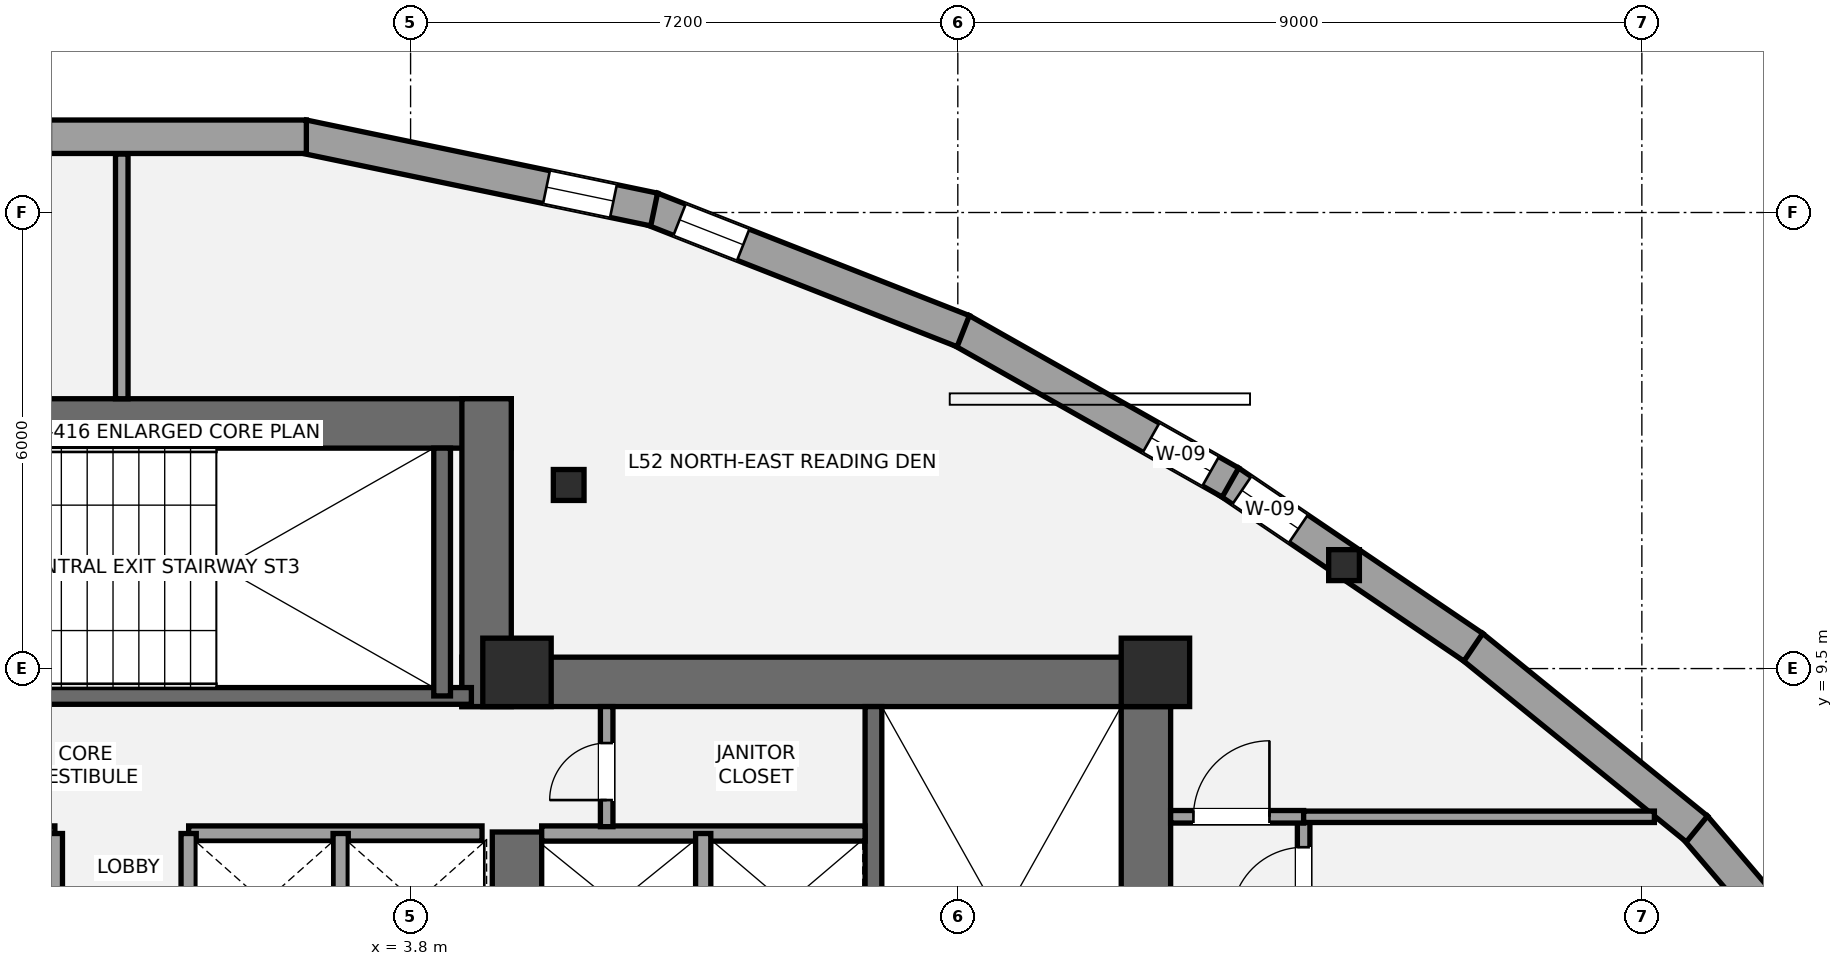
"""IFC4 building model, lengths in metres.
Left out: names, types, materials, properties, quantities, classifications, styles, units other than length and angle.
Written with IfcOpenShell. Run it as: python <this file> out.ifc"""

import sys

from ifc_helpers import new_model, si_unit, direction, frame, frame_2d, origin, origin_2d, place, context, subcontext, project, spatial, rectangle, i_section, extrude, element, fill, save


model = new_model("IFC4")
c1 = context("Model", 3, precision=1e-05, world=origin(), true_north=direction((0.0, 1.0)))
c2 = subcontext(c1, "Body", "Model", "MODEL_VIEW")
j1 = project(units=[si_unit("LENGTHUNIT", "METRE"), si_unit("PLANEANGLEUNIT", "RADIAN")], contexts=[c1])
p1 = place(None, origin())
s1 = spatial("IfcSite", under=j1, at=p1, CompositionType="ELEMENT")
p2 = place(p1, origin())
s2 = spatial("IfcBuilding", under=s1, at=p2, CompositionType="ELEMENT")
p3 = place(p2, frame((0.0, 0.0, 188.6)))
s3 = spatial("IfcBuildingStorey", under=s2, at=p3, CompositionType="ELEMENT", Elevation=188.6)
p4 = place(p3, frame((13.475, 1.2, 0.0), z_axis=(0.0, 0.0, 1.0), x_axis=(0.0, 1.0, 0.0)))
e1 = element("IfcWall", 1, at=p4, inside=s3, PredefinedType="SHEAR", context=c2, shape_type="SweptSolid", body=[
    extrude(rectangle(XDim=8.45, YDim=0.65, at=frame_2d((4.225, 0.0))), origin(), (0.0, 0.0, 1.0), 3.2),
])
p5 = place(p3, frame((4.475, 9.325, 0.0), z_axis=(0.0, 0.0, 1.0), x_axis=(1.0, 0.0, 0.0)))
e2 = element("IfcWall", 2, at=p5, inside=s3, PredefinedType="SHEAR", context=c2, shape_type="SweptSolid", body=[
    extrude(rectangle(XDim=9.325, YDim=0.65, at=frame_2d((4.663, 0.0))), origin(), (0.0, 0.0, 1.0), 3.2),
])
p6 = place(p3, frame((5.2, 5.35, 0.0), z_axis=(0.0, 0.0, 1.0), x_axis=(0.0, 1.0, 0.0)))
e3 = element("IfcWall", 3, at=p6, inside=s3, PredefinedType="SHEAR", context=c2, shape_type="SweptSolid", body=[
    extrude(rectangle(XDim=2.0, YDim=0.65, at=frame_2d((1.0, 0.0))), origin(), (0.0, 0.0, 1.0), 3.2),
])
p7 = place(p3, frame((9.89, 1.85, 0.0), z_axis=(0.0, 0.0, 1.0), x_axis=(0.0, 1.0, 0.0)))
e4 = element("IfcWall", 4, at=p7, inside=s3, PredefinedType="SHEAR", context=c2, shape_type="SweptSolid", body=[
    extrude(rectangle(XDim=7.15, YDim=0.22, at=frame_2d((3.575, 0.0))), origin(), (0.0, 0.0, 1.0), 3.2),
])
p8 = place(p3, frame((-5.125, 12.725, 0.0), z_axis=(0.0, 0.0, 1.0), x_axis=(1.0, 0.0, 0.0)))
e5 = element("IfcWall", 5, at=p8, inside=s3, PredefinedType="SHEAR", context=c2, shape_type="SweptSolid", body=[
    extrude(rectangle(XDim=10.25, YDim=0.65, at=frame_2d((5.125, 0.0))), origin(), (0.0, 0.0, 1.0), 3.2),
])
p9 = place(p3, frame((4.8, 9.0, 0.0), z_axis=(0.0, 0.0, 1.0), x_axis=(0.0, 1.0, 0.0)))
e6 = element("IfcWall", 6, at=p9, inside=s3, PredefinedType="SHEAR", context=c2, shape_type="SweptSolid", body=[
    extrude(rectangle(XDim=4.05, YDim=0.65, at=frame_2d((2.025, 0.0))), origin(), (0.0, 0.0, 1.0), 3.2),
])
p10 = place(p3, frame((-4.7, 9.14, 0.0), z_axis=(0.0, 0.0, 1.0), x_axis=(1.0, 0.0, 0.0)))
e7 = element("IfcWall", 7, at=p10, inside=s3, PredefinedType="SHEAR", context=c2, shape_type="SweptSolid", body=[
    extrude(rectangle(XDim=9.3, YDim=0.22, at=frame_2d((4.65, 0.0))), origin(), (0.0, 0.0, 1.0), 3.2),
])
p11 = place(p10, frame((1.15, 0.0, 0.0)))
e8 = element("IfcOpeningElement", 8, at=p11, cuts=e7, PredefinedType="OPENING", context=c2, shape_type="SweptSolid", body=[
    extrude(rectangle(XDim=1.05, YDim=2.15, at=frame_2d((0.525, 1.075))), frame((0.0, 0.12, 0.0), z_axis=(0.0, -1.0, 0.0), x_axis=(1.0, 0.0, 0.0)), (0.0, 0.0, 1.0), 0.24),
])
p12 = place(p3, frame((4.215, 9.14, 0.0), z_axis=(0.0, 0.0, 1.0), x_axis=(0.0, 1.0, 0.0)))
e9 = element("IfcWall", 9, at=p12, inside=s3, PredefinedType="SHEAR", context=c2, shape_type="SweptSolid", body=[
    extrude(rectangle(XDim=3.26, YDim=0.22, at=frame_2d((1.63, 0.0))), origin(), (0.0, 0.0, 1.0), 3.2),
])
for number, where, z_axis, x_axis in (
    (10, (5.2, 9.45, 0.0), (0.0, 0.0, 1.0), (1.0, 0.0, 0.0)),
    (11, (13.6, 9.45, 0.0), (0.0, 0.0, 1.0), (1.0, 0.0, 0.0)),
):
    element("IfcColumn", number, at=place(p3, frame(where, z_axis=z_axis, x_axis=x_axis)), inside=s3, PredefinedType="COLUMN", context=c2, shape_type="SweptSolid", body=[
        extrude(rectangle(XDim=0.9, YDim=0.9, at=origin_2d()), origin(), (0.0, 0.0, 1.0), 3.2),
    ])
for number, where, z_axis, x_axis in (
    (12, (16.082, 10.861, 0.0), (0.0, 0.0, 1.0), (1.0, 0.0, 0.0)),
    (13, (5.88, 11.915, 0.0), (0.0, 0.0, 1.0), (1.0, 0.0, 0.0)),
):
    element("IfcColumn", number, at=place(p3, frame(where, z_axis=z_axis, x_axis=x_axis)), inside=s3, PredefinedType="COLUMN", context=c2, shape_type="SweptSolid", body=[
        extrude(i_section(OverallWidth=0.404, OverallDepth=0.407, WebThickness=0.027, FlangeThickness=0.044, at=origin_2d()), origin(), (0.0, 0.0, 1.0), 3.2),
    ])
p13 = place(p3, frame((20.696, 7.417, 0.0), z_axis=(0.0, 0.0, 1.0), x_axis=(0.649641806751, -0.760240437573, 0.0)))
e14 = element("IfcWall", 14, at=p13, inside=s3, PredefinedType="STANDARD", context=c2, shape_type="SweptSolid", body=[
    extrude(rectangle(XDim=3.658, YDim=0.44, at=frame_2d((1.829, 0.0))), origin(), (0.0, 0.0, 1.0), 2.315),
])
p14 = place(p3, frame((17.767, 9.792, 0.0), z_axis=(0.0, 0.0, 1.0), x_axis=(0.776145361002, -0.63055402512, 0.0)))
e15 = element("IfcWall", 15, at=p14, inside=s3, PredefinedType="STANDARD", context=c2, shape_type="SweptSolid", body=[
    extrude(rectangle(XDim=3.81, YDim=0.44, at=frame_2d((1.905, 0.0))), origin(), (0.0, 0.0, 1.0), 2.315),
])
p15 = place(p3, frame((14.571, 11.957, 0.0), z_axis=(0.0, 0.0, 1.0), x_axis=(0.82772633423, -0.56113199483, 0.0)))
e16 = element("IfcWall", 16, at=p15, inside=s3, PredefinedType="STANDARD", context=c2, shape_type="SweptSolid", body=[
    extrude(rectangle(XDim=3.879, YDim=0.44, at=frame_2d((1.939, 0.0))), origin(), (0.0, 0.0, 1.0), 2.315),
])
p16 = place(p15, frame((0.2, 0.0, 0.58)))
e17 = element("IfcOpeningElement", 17, at=p16, cuts=e16, PredefinedType="OPENING", context=c2, shape_type="SweptSolid", body=[
    extrude(rectangle(XDim=0.9, YDim=1.35, at=frame_2d((0.45, 0.675))), frame((0.0, 0.23, 0.0), z_axis=(0.0, -1.0, 0.0), x_axis=(1.0, 0.0, 0.0)), (0.0, 0.0, 1.0), 0.46),
])
p17 = place(p3, frame((11.043, 13.952, 0.0), z_axis=(0.0, 0.0, 1.0), x_axis=(0.870346086449, -0.492440544434, 0.0)))
e18 = element("IfcWall", 18, at=p17, inside=s3, PredefinedType="STANDARD", context=c2, shape_type="SweptSolid", body=[
    extrude(rectangle(XDim=4.071, YDim=0.44, at=frame_2d((2.036, 0.0))), origin(), (0.0, 0.0, 1.0), 2.315),
])
p18 = place(p17, frame((2.872, 0.0, 0.58)))
e19 = element("IfcOpeningElement", 19, at=p18, cuts=e18, PredefinedType="OPENING", context=c2, shape_type="SweptSolid", body=[
    extrude(rectangle(XDim=0.9, YDim=1.35, at=frame_2d((0.45, 0.675))), frame((0.0, 0.23, 0.0), z_axis=(0.0, -1.0, 0.0), x_axis=(1.0, 0.0, 0.0)), (0.0, 0.0, 1.0), 0.46),
])
p19 = place(p3, frame((6.969, 15.55, 0.0), z_axis=(0.0, 0.0, 1.0), x_axis=(0.930777752543, -0.365585524018, 0.0)))
e20 = element("IfcWall", 20, at=p19, inside=s3, PredefinedType="STANDARD", context=c2, shape_type="SweptSolid", body=[
    extrude(rectangle(XDim=4.407, YDim=0.44, at=frame_2d((2.203, 0.0))), origin(), (0.0, 0.0, 1.0), 2.315),
])
p20 = place(p19, frame((0.397, 0.0, 0.58)))
e21 = element("IfcOpeningElement", 21, at=p20, cuts=e20, PredefinedType="OPENING", context=c2, shape_type="SweptSolid", body=[
    extrude(rectangle(XDim=0.9, YDim=1.35, at=frame_2d((0.45, 0.675))), frame((0.0, 0.23, 0.0), z_axis=(0.0, -1.0, 0.0), x_axis=(1.0, 0.0, 0.0)), (0.0, 0.0, 1.0), 0.46),
])
p21 = place(p3, frame((2.384, 16.501, 0.0), z_axis=(0.0, 0.0, 1.0), x_axis=(0.979004509935, -0.203838586943, 0.0)))
e22 = element("IfcWall", 22, at=p21, inside=s3, PredefinedType="STANDARD", context=c2, shape_type="SweptSolid", body=[
    extrude(rectangle(XDim=4.72, YDim=0.44, at=frame_2d((2.36, 0.0))), origin(), (0.0, 0.0, 1.0), 2.315),
])
p22 = place(p21, frame((3.273, 0.0, 0.58)))
e23 = element("IfcOpeningElement", 23, at=p22, cuts=e22, PredefinedType="OPENING", context=c2, shape_type="SweptSolid", body=[
    extrude(rectangle(XDim=0.9, YDim=1.35, at=frame_2d((0.45, 0.675))), frame((0.0, 0.23, 0.0), z_axis=(0.0, -1.0, 0.0), x_axis=(1.0, 0.0, 0.0)), (0.0, 0.0, 1.0), 0.46),
])
p23 = place(p3, frame((-2.429, 16.497, 0.0), z_axis=(0.0, 0.0, 1.0), x_axis=(1.0, 0.0, 0.0)))
e24 = element("IfcWall", 24, at=p23, inside=s3, PredefinedType="STANDARD", context=c2, shape_type="SweptSolid", body=[
    extrude(rectangle(XDim=4.857, YDim=0.44, at=frame_2d((2.429, 0.0))), origin(), (0.0, 0.0, 1.0), 2.315),
])
p24 = place(p23, frame((0.595, 0.0, 0.58)))
e25 = element("IfcOpeningElement", 25, at=p24, cuts=e24, PredefinedType="OPENING", context=c2, shape_type="SweptSolid", body=[
    extrude(rectangle(XDim=0.9, YDim=1.35, at=frame_2d((0.45, 0.675))), frame((0.0, 0.23, 0.0), z_axis=(0.0, -1.0, 0.0), x_axis=(1.0, 0.0, 0.0)), (0.0, 0.0, 1.0), 0.46),
])
p25 = place(p3, frame((5.525, 7.33, 0.0), z_axis=(0.0, 0.0, 1.0), x_axis=(1.0, 0.0, 0.0)))
e26 = element("IfcWall", 26, at=p25, inside=s3, PredefinedType="SOLIDWALL", context=c2, shape_type="SweptSolid", body=[
    extrude(rectangle(XDim=4.255, YDim=0.2, at=frame_2d((2.127, 0.0))), origin(), (0.0, 0.0, 1.0), 3.02),
])
p26 = place(p3, frame((7.65, 5.47, 0.0), z_axis=(0.0, 0.0, 1.0), x_axis=(0.0, 1.0, 0.0)))
e27 = element("IfcWall", 27, at=p26, inside=s3, PredefinedType="SOLIDWALL", context=c2, shape_type="SweptSolid", body=[
    extrude(rectangle(XDim=1.86, YDim=0.2, at=frame_2d((0.93, 0.0))), origin(), (0.0, 0.0, 1.0), 3.02),
])
for number, where, z_axis, x_axis in (
    (28, (-4.74, 7.33, 0.0), (0.0, 0.0, 1.0), (1.0, 0.0, 0.0)),
    (29, (0.88, 7.33, 0.0), (0.0, 0.0, 1.0), (1.0, 0.0, 0.0)),
):
    element("IfcWall", number, at=place(p3, frame(where, z_axis=z_axis, x_axis=x_axis)), inside=s3, PredefinedType="SOLIDWALL", context=c2, shape_type="SweptSolid", body=[
        extrude(rectangle(XDim=3.86, YDim=0.2, at=frame_2d((1.93, 0.0))), origin(), (0.0, 0.0, 1.0), 3.02),
    ])
for number, where, z_axis, x_axis in (
    (30, (2.88, 5.52, 0.0), (0.0, 0.0, 1.0), (0.0, 1.0, 0.0)),
    (31, (-0.88, 5.52, 0.0), (0.0, 0.0, 1.0), (0.0, 1.0, 0.0)),
    (32, (0.88, 5.52, 0.0), (0.0, 0.0, 1.0), (0.0, 1.0, 0.0)),
):
    element("IfcWall", number, at=place(p3, frame(where, z_axis=z_axis, x_axis=x_axis)), inside=s3, PredefinedType="SOLIDWALL", context=c2, shape_type="SweptSolid", body=[
        extrude(rectangle(XDim=1.81, YDim=0.2, at=frame_2d((0.905, 0.0))), origin(), (0.0, 0.0, 1.0), 3.02),
    ])
p27 = place(p3, frame((6.38, 7.42, 0.0), z_axis=(0.0, 0.0, 1.0), x_axis=(0.0, 1.0, 0.0)))
e33 = element("IfcWall", 33, at=p27, inside=s3, PredefinedType="PARTITIONING", context=c2, shape_type="SweptSolid", body=[
    extrude(rectangle(XDim=1.58, YDim=0.165, at=frame_2d((0.79, 0.0))), origin(), (0.0, 0.0, 1.0), 3.02),
])
p28 = place(p27, frame((0.35, 0.0, 0.0)))
e34 = element("IfcOpeningElement", 34, at=p28, cuts=e33, PredefinedType="OPENING", context=c2, shape_type="SweptSolid", body=[
    extrude(rectangle(XDim=0.75, YDim=2.1, at=frame_2d((0.375, 1.05))), frame((0.0, 0.093, 0.0), z_axis=(0.0, -1.0, 0.0), x_axis=(1.0, 0.0, 0.0)), (0.0, 0.0, 1.0), 0.185),
])
p29 = place(p3, frame((15.55, -11.018, 0.0), z_axis=(0.0, 0.0, 1.0), x_axis=(0.0, 1.0, 0.0)))
e35 = element("IfcWall", 35, at=p29, inside=s3, PredefinedType="PARTITIONING", context=c2, shape_type="SweptSolid", body=[
    extrude(rectangle(XDim=18.568, YDim=0.165, at=frame_2d((9.284, 0.0))), origin(), (0.0, 0.0, 1.0), 2.473),
])
p30 = place(p29, frame((4.019, 0.0, 0.0)))
e36 = element("IfcOpeningElement", 36, at=p30, cuts=e35, PredefinedType="OPENING", context=c2, shape_type="SweptSolid", body=[
    extrude(rectangle(XDim=0.85, YDim=2.1, at=frame_2d((0.425, 1.05))), frame((0.0, 0.093, 0.0), z_axis=(0.0, -1.0, 0.0), x_axis=(1.0, 0.0, 0.0)), (0.0, 0.0, 1.0), 0.185),
])
p31 = place(p29, frame((8.067, 0.0, 0.0)))
e37 = element("IfcOpeningElement", 37, at=p31, cuts=e35, PredefinedType="OPENING", context=c2, shape_type="SweptSolid", body=[
    extrude(rectangle(XDim=0.95, YDim=2.15, at=frame_2d((0.475, 1.075))), frame((0.0, 0.093, 0.0), z_axis=(0.0, -1.0, 0.0), x_axis=(1.0, 0.0, 0.0)), (0.0, 0.0, 1.0), 0.185),
])
p32 = place(p29, frame((12.468, 0.0, 0.0)))
e38 = element("IfcOpeningElement", 38, at=p32, cuts=e35, PredefinedType="OPENING", context=c2, shape_type="SweptSolid", body=[
    extrude(rectangle(XDim=0.95, YDim=2.15, at=frame_2d((0.475, 1.075))), frame((0.0, 0.093, 0.0), z_axis=(0.0, -1.0, 0.0), x_axis=(1.0, 0.0, 0.0)), (0.0, 0.0, 1.0), 0.185),
])
p33 = place(p29, frame((17.218, 0.0, 0.0)))
e39 = element("IfcOpeningElement", 39, at=p33, cuts=e35, PredefinedType="OPENING", context=c2, shape_type="SweptSolid", body=[
    extrude(rectangle(XDim=0.95, YDim=2.15, at=frame_2d((0.475, 1.075))), frame((0.0, 0.093, 0.0), z_axis=(0.0, -1.0, 0.0), x_axis=(1.0, 0.0, 0.0)), (0.0, 0.0, 1.0), 0.185),
])
p34 = place(p3, frame((13.8, 7.55, 0.0), z_axis=(0.0, 0.0, 1.0), x_axis=(1.0, 0.0, 0.0)))
e40 = element("IfcWall", 40, at=p34, inside=s3, PredefinedType="PARTITIONING", context=c2, shape_type="SweptSolid", body=[
    extrude(rectangle(XDim=1.75, YDim=0.165, at=frame_2d((0.875, 0.0))), origin(), (0.0, 0.0, 1.0), 3.02),
])
p35 = place(p34, frame((0.3, 0.0, 0.0)))
e41 = element("IfcOpeningElement", 41, at=p35, cuts=e40, PredefinedType="OPENING", context=c2, shape_type="SweptSolid", body=[
    extrude(rectangle(XDim=1.0, YDim=2.15, at=frame_2d((0.5, 1.075))), frame((0.0, 0.093, 0.0), z_axis=(0.0, -1.0, 0.0), x_axis=(1.0, 0.0, 0.0)), (0.0, 0.0, 1.0), 0.185),
])
p36 = place(p3, frame((15.55, 7.55, 0.0), z_axis=(0.0, 0.0, 1.0), x_axis=(1.0, 0.0, 0.0)))
e42 = element("IfcWall", 42, at=p36, inside=s3, PredefinedType="PLUMBINGWALL", context=c2, shape_type="SweptSolid", body=[
    extrude(rectangle(XDim=4.615, YDim=0.15, at=frame_2d((2.307, 0.0))), origin(), (0.0, 0.0, 1.0), 3.02),
])
p37 = place(p3, frame((0.0, 13.05, 0.0), z_axis=(0.0, 0.0, 1.0), x_axis=(0.0, 1.0, 0.0)))
e43 = element("IfcWall", 43, at=p37, inside=s3, PredefinedType="PARTITIONING", context=c2, shape_type="SweptSolid", body=[
    extrude(rectangle(XDim=3.219, YDim=0.165, at=frame_2d((1.609, 0.0))), origin(), (0.0, 0.0, 1.0), 3.02),
])
p38 = place(p16, origin())
e44 = element("IfcWindow", 44, at=p38, inside=s3, PartitioningType="SINGLE_PANEL", PredefinedType="WINDOW", context=c2, shape_type="SweptSolid", body=[
    extrude(rectangle(XDim=0.9, YDim=1.35, at=frame_2d((0.45, 0.675))), frame((0.0, -0.01, 0.0), z_axis=(0.0, -1.0, 0.0), x_axis=(1.0, 0.0, 0.0)), (0.0, 0.0, 1.0), 0.06),
])
fill(e17, e44)
p39 = place(p18, origin())
e45 = element("IfcWindow", 45, at=p39, inside=s3, PartitioningType="SINGLE_PANEL", PredefinedType="WINDOW", context=c2, shape_type="SweptSolid", body=[
    extrude(rectangle(XDim=0.9, YDim=1.35, at=frame_2d((0.45, 0.675))), frame((0.0, -0.01, 0.0), z_axis=(0.0, -1.0, 0.0), x_axis=(1.0, 0.0, 0.0)), (0.0, 0.0, 1.0), 0.06),
])
fill(e19, e45)
p40 = place(p20, origin())
e46 = element("IfcWindow", 46, at=p40, inside=s3, PartitioningType="SINGLE_PANEL", PredefinedType="WINDOW", context=c2, shape_type="SweptSolid", body=[
    extrude(rectangle(XDim=0.9, YDim=1.35, at=frame_2d((0.45, 0.675))), frame((0.0, -0.01, 0.0), z_axis=(0.0, -1.0, 0.0), x_axis=(1.0, 0.0, 0.0)), (0.0, 0.0, 1.0), 0.06),
])
fill(e21, e46)
p41 = place(p22, origin())
e47 = element("IfcWindow", 47, at=p41, inside=s3, PartitioningType="SINGLE_PANEL", PredefinedType="WINDOW", context=c2, shape_type="SweptSolid", body=[
    extrude(rectangle(XDim=0.9, YDim=1.35, at=frame_2d((0.45, 0.675))), frame((0.0, -0.01, 0.0), z_axis=(0.0, -1.0, 0.0), x_axis=(1.0, 0.0, 0.0)), (0.0, 0.0, 1.0), 0.06),
])
fill(e23, e47)
p42 = place(p28, origin())
e48 = element("IfcDoor", 48, at=p42, inside=s3, OperationType="SINGLE_SWING_LEFT", PredefinedType="DOOR", context=c2, shape_type="SweptSolid", body=[
    extrude(rectangle(XDim=0.75, YDim=2.1, at=frame_2d((0.375, 1.05))), frame((0.0, 0.025, 0.0), z_axis=(0.0, -1.0, 0.0), x_axis=(1.0, 0.0, 0.0)), (0.0, 0.0, 1.0), 0.05),
])
fill(e34, e48)
p43 = place(p35, origin())
e49 = element("IfcDoor", 49, at=p43, inside=s3, OperationType="SINGLE_SWING_RIGHT", PredefinedType="DOOR", context=c2, shape_type="SweptSolid", body=[
    extrude(rectangle(XDim=1.0, YDim=2.15, at=frame_2d((0.5, 1.075))), frame((0.0, 0.025, 0.0), z_axis=(0.0, -1.0, 0.0), x_axis=(1.0, 0.0, 0.0)), (0.0, 0.0, 1.0), 0.05),
])
fill(e41, e49)
p44 = place(p33, origin())
e50 = element("IfcDoor", 50, at=p44, inside=s3, OperationType="SINGLE_SWING_LEFT", PredefinedType="DOOR", context=c2, shape_type="SweptSolid", body=[
    extrude(rectangle(XDim=0.95, YDim=2.15, at=frame_2d((0.475, 1.075))), frame((0.0, 0.025, 0.0), z_axis=(0.0, -1.0, 0.0), x_axis=(1.0, 0.0, 0.0)), (0.0, 0.0, 1.0), 0.05),
])
fill(e39, e50)
save(model, sys.argv[1])
